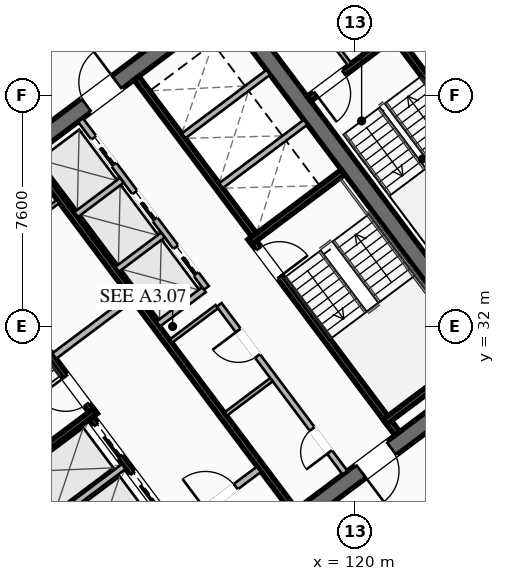
"""IFC4 building model, lengths in metres.
Left out: names, types, materials, properties, quantities, classifications, styles, units other than length and angle.
Written with IfcOpenShell. Run it as: python <this file> out.ifc"""

import sys

from ifc_helpers import new_model, si_unit, direction, frame, frame_2d, origin, place, context, subcontext, project, spatial, rectangle, extrude, element, fill, save


model = new_model("IFC4")
c1 = context("Model", 3, precision=1e-05, world=origin(), true_north=direction((0.0, 1.0)))
c2 = subcontext(c1, "Body", "Model", "MODEL_VIEW")
j1 = project(units=[si_unit("LENGTHUNIT", "METRE"), si_unit("PLANEANGLEUNIT", "RADIAN")], contexts=[c1])
p1 = place(None, origin())
s1 = spatial("IfcSite", under=j1, at=p1, CompositionType="ELEMENT")
p2 = place(p1, origin())
s2 = spatial("IfcBuilding", under=s1, at=p2, CompositionType="ELEMENT")
p3 = place(p2, frame((0.0, 0.0, 135.7)))
s3 = spatial("IfcBuildingStorey", under=s2, at=p3, CompositionType="ELEMENT", Elevation=135.7)
for number, where, z_axis, x_axis in (
    (1, (112.436, 21.077, 0.0), (0.0, 0.0, 1.0), (-0.6, 0.8, 0.0)),
    (2, (115.564, 42.923, 0.0), (0.0, 0.0, 1.0), (0.6, -0.8, 0.0)),
):
    element("IfcWall", number, at=place(p3, frame(where, z_axis=z_axis, x_axis=x_axis)), inside=s3, PredefinedType="SHEAR", context=c2, shape_type="SweptSolid", body=[
        extrude(rectangle(XDim=15.6, YDim=0.55, at=frame_2d((7.8, 0.0))), origin(), (0.0, 0.0, 1.0), 3.55),
    ])
p4 = place(p3, frame((124.539, 30.498, 0.0), z_axis=(0.0, 0.0, 1.0), x_axis=(-0.799998054672, -0.600002593761, 0.0)))
e3 = element("IfcWall", 3, at=p4, inside=s3, PredefinedType="SHEAR", context=c2, shape_type="SweptSolid", body=[
    extrude(rectangle(XDim=15.06, YDim=0.55, at=frame_2d((7.53, 0.0))), origin(), (0.0, 0.0, 1.0), 3.55),
])
p5 = place(p4, frame((9.23, 0.0, 0.0)))
e4 = element("IfcOpeningElement", 4, at=p5, cuts=e3, PredefinedType="OPENING", context=c2, shape_type="SweptSolid", body=[
    extrude(rectangle(XDim=1.25, YDim=2.25, at=frame_2d((0.625, 1.125))), frame((0.0, 0.285, 0.0), z_axis=(0.0, -1.0, 0.0), x_axis=(1.0, 0.0, 0.0)), (0.0, 0.0, 1.0), 0.57),
])
p6 = place(p4, frame((4.18, 0.0, 0.0)))
e5 = element("IfcOpeningElement", 5, at=p6, cuts=e3, PredefinedType="OPENING", context=c2, shape_type="SweptSolid", body=[
    extrude(rectangle(XDim=1.25, YDim=2.25, at=frame_2d((0.625, 1.125))), frame((0.0, 0.285, 0.0), z_axis=(0.0, -1.0, 0.0), x_axis=(1.0, 0.0, 0.0)), (0.0, 0.0, 1.0), 0.57),
])
p7 = place(p3, frame((103.461, 33.502, 0.0), z_axis=(0.0, 0.0, 1.0), x_axis=(0.799998054672, 0.600002593761, 0.0)))
e6 = element("IfcWall", 6, at=p7, inside=s3, PredefinedType="SHEAR", context=c2, shape_type="SweptSolid", body=[
    extrude(rectangle(XDim=15.06, YDim=0.55, at=frame_2d((7.53, 0.0))), origin(), (0.0, 0.0, 1.0), 3.55),
])
p8 = place(p7, frame((4.58, 0.0, 0.0)))
e7 = element("IfcOpeningElement", 7, at=p8, cuts=e6, PredefinedType="OPENING", context=c2, shape_type="SweptSolid", body=[
    extrude(rectangle(XDim=1.25, YDim=2.25, at=frame_2d((0.625, 1.125))), frame((0.0, 0.285, 0.0), z_axis=(0.0, -1.0, 0.0), x_axis=(1.0, 0.0, 0.0)), (0.0, 0.0, 1.0), 0.57),
])
p9 = place(p7, frame((9.63, 0.0, 0.0)))
e8 = element("IfcOpeningElement", 8, at=p9, cuts=e6, PredefinedType="OPENING", context=c2, shape_type="SweptSolid", body=[
    extrude(rectangle(XDim=1.25, YDim=2.25, at=frame_2d((0.625, 1.125))), frame((0.0, 0.285, 0.0), z_axis=(0.0, -1.0, 0.0), x_axis=(1.0, 0.0, 0.0)), (0.0, 0.0, 1.0), 0.57),
])
p10 = place(p3, frame((111.44, 29.08, 0.0), z_axis=(0.0, 0.0, 1.0), x_axis=(-0.59999029481, 0.8000072788, 0.0)))
e9 = element("IfcWall", 9, at=p10, inside=s3, PredefinedType="SHEAR", context=c2, shape_type="SweptSolid", body=[
    extrude(rectangle(XDim=8.05, YDim=0.2, at=frame_2d((4.025, 0.0))), origin(), (0.0, 0.0, 1.0), 3.37),
])
p11 = place(p10, frame((0.45, 0.0, 0.0)))
e10 = element("IfcOpeningElement", 10, at=p11, cuts=e9, PredefinedType="OPENING", context=c2, shape_type="SweptSolid", body=[
    extrude(rectangle(XDim=1.15, YDim=2.2, at=frame_2d((0.575, 1.1))), frame((0.0, 0.11, 0.0), z_axis=(0.0, -1.0, 0.0), x_axis=(1.0, 0.0, 0.0)), (0.0, 0.0, 1.0), 0.22),
])
p12 = place(p3, frame((108.396, 26.922, 0.0), z_axis=(0.0, 0.0, 1.0), x_axis=(0.800015298837, 0.599979601008, 0.0)))
e11 = element("IfcWall", 11, at=p12, inside=s3, PredefinedType="SHEAR", context=c2, shape_type="SweptSolid", body=[
    extrude(rectangle(XDim=3.83, YDim=0.2, at=frame_2d((1.915, 0.0))), origin(), (0.0, 0.0, 1.0), 3.37),
])
p13 = place(p3, frame((116.56, 34.92, 0.0), z_axis=(0.0, 0.0, 1.0), x_axis=(0.59999029481, -0.8000072788, 0.0)))
e12 = element("IfcWall", 12, at=p13, inside=s3, PredefinedType="SHEAR", context=c2, shape_type="SweptSolid", body=[
    extrude(rectangle(XDim=8.05, YDim=0.2, at=frame_2d((4.025, 0.0))), origin(), (0.0, 0.0, 1.0), 3.37),
])
p14 = place(p13, frame((0.45, 0.0, 0.0)))
e13 = element("IfcOpeningElement", 13, at=p14, cuts=e12, PredefinedType="OPENING", context=c2, shape_type="SweptSolid", body=[
    extrude(rectangle(XDim=1.15, YDim=2.2, at=frame_2d((0.575, 1.1))), frame((0.0, 0.11, 0.0), z_axis=(0.0, -1.0, 0.0), x_axis=(1.0, 0.0, 0.0)), (0.0, 0.0, 1.0), 0.22),
])
for number, where, z_axis, x_axis in (
    (14, (116.54, 34.78, 0.0), (0.0, 0.0, 1.0), (0.8, 0.6, 0.0)),
    (15, (120.98, 28.86, 0.0), (0.0, 0.0, 1.0), (0.8, 0.6, 0.0)),
):
    element("IfcWall", number, at=place(p3, frame(where, z_axis=z_axis, x_axis=x_axis)), inside=s3, PredefinedType="SHEAR", context=c2, shape_type="SweptSolid", body=[
        extrude(rectangle(XDim=3.83, YDim=0.2, at=frame_2d((1.915, 0.0))), origin(), (0.0, 0.0, 1.0), 3.37),
    ])
p15 = place(p3, frame((117.998, 25.936, 0.0), z_axis=(0.0, 0.0, 1.0), x_axis=(-0.600002693989, 0.799997979501, 0.0)))
e16 = element("IfcWall", 16, at=p15, inside=s3, PredefinedType="SHEAR", context=c2, shape_type="SweptSolid", body=[
    extrude(rectangle(XDim=14.5, YDim=0.2, at=frame_2d((7.25, 0.0))), origin(), (0.0, 0.0, 1.0), 3.37),
])
p16 = place(p3, frame((110.104, 31.028, 0.0), z_axis=(0.0, 0.0, 1.0), x_axis=(0.800018601094, 0.59997519774, 0.0)))
e17 = element("IfcWall", 17, at=p16, inside=s3, PredefinedType="SOLIDWALL", context=c2, shape_type="SweptSolid", body=[
    extrude(rectangle(XDim=3.15, YDim=0.22, at=frame_2d((1.575, 0.0))), origin(), (0.0, 0.0, 1.0), 2.723),
])
p17 = place(p3, frame((114.316, 25.412, 0.0), z_axis=(0.0, 0.0, 1.0), x_axis=(0.800018601094, 0.59997519774, 0.0)))
e18 = element("IfcWall", 18, at=p17, inside=s3, PredefinedType="SOLIDWALL", context=c2, shape_type="SweptSolid", body=[
    extrude(rectangle(XDim=3.15, YDim=0.22, at=frame_2d((1.575, 0.0))), origin(), (0.0, 0.0, 1.0), 2.723),
])
p18 = place(p17, frame((0.95, 0.0, 0.0)))
e19 = element("IfcOpeningElement", 19, at=p18, cuts=e18, PredefinedType="OPENING", context=c2, shape_type="SweptSolid", body=[
    extrude(rectangle(XDim=1.25, YDim=2.25, at=frame_2d((0.625, 1.125))), frame((0.0, 0.12, 0.0), z_axis=(0.0, -1.0, 0.0), x_axis=(1.0, 0.0, 0.0)), (0.0, 0.0, 1.0), 0.24),
])
p19 = place(p3, frame((115.19, 23.83, 0.0), z_axis=(0.0, 0.0, 1.0), x_axis=(-0.599993943644, 0.800004542231, 0.0)))
e20 = element("IfcWall", 20, at=p19, inside=s3, PredefinedType="SHEAR", context=c2, shape_type="SweptSolid", body=[
    extrude(rectangle(XDim=6.45, YDim=0.2, at=frame_2d((3.225, 0.0))), origin(), (0.0, 0.0, 1.0), 3.37),
])
p20 = place(p19, frame((4.875, 0.0, 0.0)))
e21 = element("IfcOpeningElement", 21, at=p20, cuts=e20, PredefinedType="OPENING", context=c2, shape_type="SweptSolid", body=[
    extrude(rectangle(XDim=1.3, YDim=2.25, at=frame_2d((0.65, 1.125))), frame((0.0, 0.11, 0.0), z_axis=(0.0, -1.0, 0.0), x_axis=(1.0, 0.0, 0.0)), (0.0, 0.0, 1.0), 0.22),
])
p21 = place(p19, frame((2.875, 0.0, 0.0)))
e22 = element("IfcOpeningElement", 22, at=p21, cuts=e20, PredefinedType="OPENING", context=c2, shape_type="SweptSolid", body=[
    extrude(rectangle(XDim=1.3, YDim=2.25, at=frame_2d((0.65, 1.125))), frame((0.0, 0.11, 0.0), z_axis=(0.0, -1.0, 0.0), x_axis=(1.0, 0.0, 0.0)), (0.0, 0.0, 1.0), 0.22),
])
p22 = place(p19, frame((0.675, 0.0, 0.0)))
e23 = element("IfcOpeningElement", 23, at=p22, cuts=e20, PredefinedType="OPENING", context=c2, shape_type="SweptSolid", body=[
    extrude(rectangle(XDim=1.3, YDim=2.25, at=frame_2d((0.65, 1.125))), frame((0.0, 0.11, 0.0), z_axis=(0.0, -1.0, 0.0), x_axis=(1.0, 0.0, 0.0)), (0.0, 0.0, 1.0), 0.22),
])
p23 = place(p3, frame((109.608, 25.306, 0.0), z_axis=(0.0, 0.0, 1.0), x_axis=(0.8, 0.6, 0.0)))
e24 = element("IfcWall", 24, at=p23, inside=s3, PredefinedType="SOLIDWALL", context=c2, shape_type="SweptSolid", body=[
    extrude(rectangle(XDim=3.48, YDim=0.2, at=frame_2d((1.74, 0.0))), origin(), (0.0, 0.0, 1.0), 3.37),
])
p24 = place(p3, frame((112.81, 40.17, 0.0), z_axis=(0.0, 0.0, 1.0), x_axis=(0.599993943644, -0.800004542231, 0.0)))
e25 = element("IfcWall", 25, at=p24, inside=s3, PredefinedType="SHEAR", context=c2, shape_type="SweptSolid", body=[
    extrude(rectangle(XDim=6.45, YDim=0.2, at=frame_2d((3.225, 0.0))), origin(), (0.0, 0.0, 1.0), 3.37),
])
for number, where, z_axis, x_axis in (
    (26, (115.59, 36.63, 0.0), (0.0, 0.0, 1.0), (0.8, 0.6, 0.0)),
    (27, (114.36, 38.27, 0.0), (0.0, 0.0, 1.0), (0.8, 0.6, 0.0)),
):
    element("IfcWall", number, at=place(p3, frame(where, z_axis=z_axis, x_axis=x_axis)), inside=s3, PredefinedType="SOLIDWALL", context=c2, shape_type="SweptSolid", body=[
        extrude(rectangle(XDim=3.48, YDim=0.2, at=frame_2d((1.74, 0.0))), origin(), (0.0, 0.0, 1.0), 3.37),
    ])
p25 = place(p3, frame((107.71, 34.22, 0.0), z_axis=(0.0, 0.0, 1.0), x_axis=(0.799981399002, 0.60002480053, 0.0)))
e28 = element("IfcWall", 28, at=p25, inside=s3, PredefinedType="PARTITIONING", context=c2, shape_type="SweptSolid", body=[
    extrude(rectangle(XDim=3.15, YDim=0.135, at=frame_2d((1.575, 0.0))), origin(), (0.0, 0.0, 1.0), 2.723),
])
p26 = place(p25, frame((1.05, 0.0, 0.0)))
e29 = element("IfcOpeningElement", 29, at=p26, cuts=e28, PredefinedType="OPENING", context=c2, shape_type="SweptSolid", body=[
    extrude(rectangle(XDim=1.05, YDim=2.2, at=frame_2d((0.525, 1.1))), frame((0.0, 0.077, 0.0), z_axis=(0.0, -1.0, 0.0), x_axis=(1.0, 0.0, 0.0)), (0.0, 0.0, 1.0), 0.155),
])
p27 = place(p3, frame((119.67, 27.19, 0.0), z_axis=(0.0, 0.0, 1.0), x_axis=(-0.599988677396, 0.800008491828, 0.0)))
e30 = element("IfcWall", 30, at=p27, inside=s3, PredefinedType="SOLIDWALL", context=c2, shape_type="SweptSolid", body=[
    extrude(rectangle(XDim=6.9, YDim=0.2, at=frame_2d((3.45, 0.0))), origin(), (0.0, 0.0, 1.0), 2.723),
])
p28 = place(p27, frame((0.85, 0.0, 0.0)))
e31 = element("IfcOpeningElement", 31, at=p28, cuts=e30, PredefinedType="OPENING", context=c2, shape_type="SweptSolid", body=[
    extrude(rectangle(XDim=0.95, YDim=2.05, at=frame_2d((0.475, 1.025))), frame((0.0, 0.11, 0.0), z_axis=(0.0, -1.0, 0.0), x_axis=(1.0, 0.0, 0.0)), (0.0, 0.0, 1.0), 0.22),
])
p29 = place(p27, frame((4.8, 0.0, 0.0)))
e32 = element("IfcOpeningElement", 32, at=p29, cuts=e30, PredefinedType="OPENING", context=c2, shape_type="SweptSolid", body=[
    extrude(rectangle(XDim=1.05, YDim=2.2, at=frame_2d((0.525, 1.1))), frame((0.0, 0.11, 0.0), z_axis=(0.0, -1.0, 0.0), x_axis=(1.0, 0.0, 0.0)), (0.0, 0.0, 1.0), 0.22),
])
for number, where, z_axis, x_axis in (
    (33, (113.946, 31.522, 0.0), (0.0, 0.0, 1.0), (0.8, 0.6, 0.0)),
    (34, (115.746, 29.122, 0.0), (0.0, 0.0, 1.0), (0.8, 0.6, 0.0)),
):
    element("IfcWall", number, at=place(p3, frame(where, z_axis=z_axis, x_axis=x_axis)), inside=s3, PredefinedType="PARTITIONING", context=c2, shape_type="SweptSolid", body=[
        extrude(rectangle(XDim=1.88, YDim=0.135, at=frame_2d((0.94, 0.0))), origin(), (0.0, 0.0, 1.0), 2.723),
    ])
p30 = place(p3, frame((115.11, 33.27, 0.0), z_axis=(0.0, 0.0, 1.0), x_axis=(-0.600011322243, 0.799991508192, 0.0)))
e35 = element("IfcWall", 35, at=p30, inside=s3, PredefinedType="SOLIDWALL", context=c2, shape_type="SweptSolid", body=[
    extrude(rectangle(XDim=6.9, YDim=0.2, at=frame_2d((3.45, 0.0))), origin(), (0.0, 0.0, 1.0), 3.37),
])
p31 = place(p30, frame((0.575, 0.0, 0.0)))
e36 = element("IfcOpeningElement", 36, at=p31, cuts=e35, PredefinedType="OPENING", context=c2, shape_type="SweptSolid", body=[
    extrude(rectangle(XDim=1.1, YDim=2.2, at=frame_2d((0.55, 1.1))), frame((0.0, 0.11, 0.0), z_axis=(0.0, -1.0, 0.0), x_axis=(1.0, 0.0, 0.0)), (0.0, 0.0, 1.0), 0.22),
])
p32 = place(p30, frame((2.825, 0.0, 0.0)))
e37 = element("IfcOpeningElement", 37, at=p32, cuts=e35, PredefinedType="OPENING", context=c2, shape_type="SweptSolid", body=[
    extrude(rectangle(XDim=1.1, YDim=2.2, at=frame_2d((0.55, 1.1))), frame((0.0, 0.11, 0.0), z_axis=(0.0, -1.0, 0.0), x_axis=(1.0, 0.0, 0.0)), (0.0, 0.0, 1.0), 0.22),
])
p33 = place(p30, frame((5.075, 0.0, 0.0)))
e38 = element("IfcOpeningElement", 38, at=p33, cuts=e35, PredefinedType="OPENING", context=c2, shape_type="SweptSolid", body=[
    extrude(rectangle(XDim=1.1, YDim=2.2, at=frame_2d((0.55, 1.1))), frame((0.0, 0.11, 0.0), z_axis=(0.0, -1.0, 0.0), x_axis=(1.0, 0.0, 0.0)), (0.0, 0.0, 1.0), 0.22),
])
p34 = place(p3, frame((113.526, 32.082, 0.0), z_axis=(0.0, 0.0, 1.0), x_axis=(0.800046745961, 0.599937666993, 0.0)))
e39 = element("IfcWall", 39, at=p34, inside=s3, PredefinedType="SOLIDWALL", context=c2, shape_type="SweptSolid", body=[
    extrude(rectangle(XDim=1.88, YDim=0.2, at=frame_2d((0.94, 0.0))), origin(), (0.0, 0.0, 1.0), 3.37),
])
p35 = place(p3, frame((112.176, 33.882, 0.0), z_axis=(0.0, 0.0, 1.0), x_axis=(0.8, 0.6, 0.0)))
e40 = element("IfcWall", 40, at=p35, inside=s3, PredefinedType="SOLIDWALL", context=c2, shape_type="SweptSolid", body=[
    extrude(rectangle(XDim=1.88, YDim=0.2, at=frame_2d((0.94, 0.0))), origin(), (0.0, 0.0, 1.0), 3.37),
])
p36 = place(p3, frame((110.826, 35.682, 0.0), z_axis=(0.0, 0.0, 1.0), x_axis=(0.799984418148, 0.600020775241, 0.0)))
e41 = element("IfcWall", 41, at=p36, inside=s3, PredefinedType="SOLIDWALL", context=c2, shape_type="SweptSolid", body=[
    extrude(rectangle(XDim=1.88, YDim=0.2, at=frame_2d((0.94, 0.0))), origin(), (0.0, 0.0, 1.0), 3.37),
])
p37 = place(p3, frame((125.304, 36.228, 0.0), z_axis=(0.0, 0.0, 1.0), x_axis=(-0.59998851072, 0.800008616831, 0.0)))
e42 = element("IfcWall", 42, at=p37, inside=s3, PredefinedType="SHEAR", context=c2, shape_type="SweptSolid", body=[
    extrude(rectangle(XDim=6.8, YDim=0.2, at=frame_2d((3.4, 0.0))), origin(), (0.0, 0.0, 1.0), 3.37),
])
p38 = place(p3, frame((121.204, 41.528, 0.0), z_axis=(0.0, 0.0, 1.0), x_axis=(-0.800017232136, -0.599977023131, 0.0)))
e43 = element("IfcWall", 43, at=p38, inside=s3, PredefinedType="SHEAR", context=c2, shape_type="SweptSolid", body=[
    extrude(rectangle(XDim=3.4, YDim=0.2, at=frame_2d((1.7, 0.0))), origin(), (0.0, 0.0, 1.0), 3.37),
])
p39 = place(p38, frame((1.975, 0.0, 0.0)))
e44 = element("IfcOpeningElement", 44, at=p39, cuts=e43, PredefinedType="OPENING", context=c2, shape_type="SweptSolid", body=[
    extrude(rectangle(XDim=1.15, YDim=2.2, at=frame_2d((0.575, 1.1))), frame((0.0, 0.11, 0.0), z_axis=(0.0, -1.0, 0.0), x_axis=(1.0, 0.0, 0.0)), (0.0, 0.0, 1.0), 0.22),
])
p40 = place(p3, frame((119.824, 40.618, 0.0), z_axis=(0.0, 0.0, 1.0), x_axis=(-0.599982243973, 0.800013316712, 0.0)))
e45 = element("IfcWall", 45, at=p40, inside=s3, PredefinedType="PARTITIONING", context=c2, shape_type="SweptSolid", body=[
    extrude(rectangle(XDim=4.4, YDim=0.135, at=frame_2d((2.2, 0.0))), origin(), (0.0, 0.0, 1.0), 2.723),
])
p41 = place(p3, frame((94.79, 31.53, 0.0), z_axis=(0.0, 0.0, 1.0), x_axis=(0.8, 0.6, 0.0)))
e46 = element("IfcWall", 46, at=p41, inside=s3, PredefinedType="PARTITIONING", context=c2, shape_type="SweptSolid", body=[
    extrude(rectangle(XDim=31.3, YDim=0.135, at=frame_2d((15.65, 0.0))), origin(), (0.0, 0.0, 1.0), 2.723),
])
p42 = place(p41, frame((0.3, 0.0, 0.0)))
e47 = element("IfcOpeningElement", 47, at=p42, cuts=e46, PredefinedType="OPENING", context=c2, shape_type="SweptSolid", body=[
    extrude(rectangle(XDim=0.95, YDim=2.05, at=frame_2d((0.475, 1.025))), frame((0.0, 0.077, 0.0), z_axis=(0.0, -1.0, 0.0), x_axis=(1.0, 0.0, 0.0)), (0.0, 0.0, 1.0), 0.155),
])
p43 = place(p41, frame((15.263, 0.0, 0.0)))
e48 = element("IfcOpeningElement", 48, at=p43, cuts=e46, PredefinedType="OPENING", context=c2, shape_type="SweptSolid", body=[
    extrude(rectangle(XDim=0.95, YDim=2.05, at=frame_2d((0.475, 1.025))), frame((0.0, 0.077, 0.0), z_axis=(0.0, -1.0, 0.0), x_axis=(1.0, 0.0, 0.0)), (0.0, 0.0, 1.0), 0.155),
])
p44 = place(p41, frame((30.05, 0.0, 0.0)))
e49 = element("IfcOpeningElement", 49, at=p44, cuts=e46, PredefinedType="OPENING", context=c2, shape_type="SweptSolid", body=[
    extrude(rectangle(XDim=0.95, YDim=2.05, at=frame_2d((0.475, 1.025))), frame((0.0, 0.077, 0.0), z_axis=(0.0, -1.0, 0.0), x_axis=(1.0, 0.0, 0.0)), (0.0, 0.0, 1.0), 0.155),
])
p45 = place(p3, frame((133.102, 32.614, 0.0), z_axis=(0.0, 0.0, 1.0), x_axis=(-0.8, -0.6, 0.0)))
e50 = element("IfcWall", 50, at=p45, inside=s3, PredefinedType="PARTITIONING", context=c2, shape_type="SweptSolid", body=[
    extrude(rectangle(XDim=31.3, YDim=0.135, at=frame_2d((15.65, 0.0))), origin(), (0.0, 0.0, 1.0), 2.723),
])
p46 = place(p45, frame((29.97, 0.0, 0.0)))
e51 = element("IfcOpeningElement", 51, at=p46, cuts=e50, PredefinedType="OPENING", context=c2, shape_type="SweptSolid", body=[
    extrude(rectangle(XDim=0.95, YDim=2.05, at=frame_2d((0.475, 1.025))), frame((0.0, 0.077, 0.0), z_axis=(0.0, -1.0, 0.0), x_axis=(1.0, 0.0, 0.0)), (0.0, 0.0, 1.0), 0.155),
])
p47 = place(p45, frame((0.38, 0.0, 0.0)))
e52 = element("IfcOpeningElement", 52, at=p47, cuts=e50, PredefinedType="OPENING", context=c2, shape_type="SweptSolid", body=[
    extrude(rectangle(XDim=0.95, YDim=2.05, at=frame_2d((0.475, 1.025))), frame((0.0, 0.077, 0.0), z_axis=(0.0, -1.0, 0.0), x_axis=(1.0, 0.0, 0.0)), (0.0, 0.0, 1.0), 0.155),
])
p48 = place(p3, frame((112.104, 20.928, 0.0), z_axis=(0.0, 0.0, 1.0), x_axis=(-0.599994940075, 0.800003794918, 0.0)))
e53 = element("IfcWall", 53, at=p48, inside=s3, PredefinedType="PARTITIONING", context=c2, shape_type="SweptSolid", body=[
    extrude(rectangle(XDim=15.44, YDim=0.135, at=frame_2d((7.72, 0.0))), origin(), (0.0, 0.0, 1.0), 2.723),
])
p49 = place(p9, origin())
e54 = element("IfcDoor", 54, at=p49, inside=s3, OperationType="SINGLE_SWING_RIGHT", PredefinedType="DOOR", context=c2, shape_type="SweptSolid", body=[
    extrude(rectangle(XDim=1.25, YDim=2.25, at=frame_2d((0.625, 1.125))), frame((0.0, 0.025, 0.0), z_axis=(0.0, -1.0, 0.0), x_axis=(1.0, 0.0, 0.0)), (0.0, 0.0, 1.0), 0.05),
])
fill(e8, e54)
p50 = place(p6, origin())
e55 = element("IfcDoor", 55, at=p50, inside=s3, OperationType="SINGLE_SWING_RIGHT", PredefinedType="DOOR", context=c2, shape_type="SweptSolid", body=[
    extrude(rectangle(XDim=1.25, YDim=2.25, at=frame_2d((0.625, 1.125))), frame((0.0, 0.025, 0.0), z_axis=(0.0, -1.0, 0.0), x_axis=(1.0, 0.0, 0.0)), (0.0, 0.0, 1.0), 0.05),
])
fill(e5, e55)
p51 = place(p11, origin())
e56 = element("IfcDoor", 56, at=p51, inside=s3, OperationType="SINGLE_SWING_RIGHT", PredefinedType="DOOR", context=c2, shape_type="SweptSolid", body=[
    extrude(rectangle(XDim=1.15, YDim=2.2, at=frame_2d((0.575, 1.1))), frame((0.0, 0.025, 0.0), z_axis=(0.0, -1.0, 0.0), x_axis=(1.0, 0.0, 0.0)), (0.0, 0.0, 1.0), 0.05),
])
fill(e10, e56)
p52 = place(p14, origin())
e57 = element("IfcDoor", 57, at=p52, inside=s3, OperationType="SINGLE_SWING_RIGHT", PredefinedType="DOOR", context=c2, shape_type="SweptSolid", body=[
    extrude(rectangle(XDim=1.15, YDim=2.2, at=frame_2d((0.575, 1.1))), frame((0.0, 0.025, 0.0), z_axis=(0.0, -1.0, 0.0), x_axis=(1.0, 0.0, 0.0)), (0.0, 0.0, 1.0), 0.05),
])
fill(e13, e57)
p53 = place(p18, origin())
e58 = element("IfcDoor", 58, at=p53, inside=s3, OperationType="SINGLE_SWING_LEFT", PredefinedType="DOOR", context=c2, shape_type="SweptSolid", body=[
    extrude(rectangle(XDim=1.25, YDim=2.25, at=frame_2d((0.625, 1.125))), frame((0.0, 0.025, 0.0), z_axis=(0.0, -1.0, 0.0), x_axis=(1.0, 0.0, 0.0)), (0.0, 0.0, 1.0), 0.05),
])
fill(e19, e58)
p54 = place(p28, origin())
e59 = element("IfcDoor", 59, at=p54, inside=s3, OperationType="SINGLE_SWING_LEFT", PredefinedType="DOOR", context=c2, shape_type="SweptSolid", body=[
    extrude(rectangle(XDim=0.95, YDim=2.05, at=frame_2d((0.475, 1.025))), frame((0.0, 0.025, 0.0), z_axis=(0.0, -1.0, 0.0), x_axis=(1.0, 0.0, 0.0)), (0.0, 0.0, 1.0), 0.05),
])
fill(e31, e59)
p55 = place(p29, origin())
e60 = element("IfcDoor", 60, at=p55, inside=s3, OperationType="SINGLE_SWING_RIGHT", PredefinedType="DOOR", context=c2, shape_type="SweptSolid", body=[
    extrude(rectangle(XDim=1.05, YDim=2.2, at=frame_2d((0.525, 1.1))), frame((0.0, 0.025, 0.0), z_axis=(0.0, -1.0, 0.0), x_axis=(1.0, 0.0, 0.0)), (0.0, 0.0, 1.0), 0.05),
])
fill(e32, e60)
p56 = place(p39, origin())
e61 = element("IfcDoor", 61, at=p56, inside=s3, OperationType="SINGLE_SWING_RIGHT", PredefinedType="DOOR", context=c2, shape_type="SweptSolid", body=[
    extrude(rectangle(XDim=1.15, YDim=2.2, at=frame_2d((0.575, 1.1))), frame((0.0, 0.025, 0.0), z_axis=(0.0, -1.0, 0.0), x_axis=(1.0, 0.0, 0.0)), (0.0, 0.0, 1.0), 0.05),
])
fill(e44, e61)
p57 = place(p20, origin())
e62 = element("IfcDoor", 62, at=p57, inside=s3, OperationType="SLIDING_TO_LEFT", PredefinedType="DOOR", context=c2, shape_type="SweptSolid", body=[
    extrude(rectangle(XDim=1.3, YDim=2.25, at=frame_2d((0.65, 1.125))), frame((0.0, 0.025, 0.0), z_axis=(0.0, -1.0, 0.0), x_axis=(1.0, 0.0, 0.0)), (0.0, 0.0, 1.0), 0.05),
])
fill(e21, e62)
p58 = place(p21, origin())
e63 = element("IfcDoor", 63, at=p58, inside=s3, OperationType="SLIDING_TO_LEFT", PredefinedType="DOOR", context=c2, shape_type="SweptSolid", body=[
    extrude(rectangle(XDim=1.3, YDim=2.25, at=frame_2d((0.65, 1.125))), frame((0.0, 0.025, 0.0), z_axis=(0.0, -1.0, 0.0), x_axis=(1.0, 0.0, 0.0)), (0.0, 0.0, 1.0), 0.05),
])
fill(e22, e63)
p59 = place(p31, origin())
e64 = element("IfcDoor", 64, at=p59, inside=s3, OperationType="SLIDING_TO_LEFT", PredefinedType="DOOR", context=c2, shape_type="SweptSolid", body=[
    extrude(rectangle(XDim=1.1, YDim=2.2, at=frame_2d((0.55, 1.1))), frame((0.0, 0.025, 0.0), z_axis=(0.0, -1.0, 0.0), x_axis=(1.0, 0.0, 0.0)), (0.0, 0.0, 1.0), 0.05),
])
fill(e36, e64)
p60 = place(p32, origin())
e65 = element("IfcDoor", 65, at=p60, inside=s3, OperationType="SLIDING_TO_LEFT", PredefinedType="DOOR", context=c2, shape_type="SweptSolid", body=[
    extrude(rectangle(XDim=1.1, YDim=2.2, at=frame_2d((0.55, 1.1))), frame((0.0, 0.025, 0.0), z_axis=(0.0, -1.0, 0.0), x_axis=(1.0, 0.0, 0.0)), (0.0, 0.0, 1.0), 0.05),
])
fill(e37, e65)
p61 = place(p33, origin())
e66 = element("IfcDoor", 66, at=p61, inside=s3, OperationType="SLIDING_TO_LEFT", PredefinedType="DOOR", context=c2, shape_type="SweptSolid", body=[
    extrude(rectangle(XDim=1.1, YDim=2.2, at=frame_2d((0.55, 1.1))), frame((0.0, 0.025, 0.0), z_axis=(0.0, -1.0, 0.0), x_axis=(1.0, 0.0, 0.0)), (0.0, 0.0, 1.0), 0.05),
])
fill(e38, e66)
save(model, sys.argv[1])
